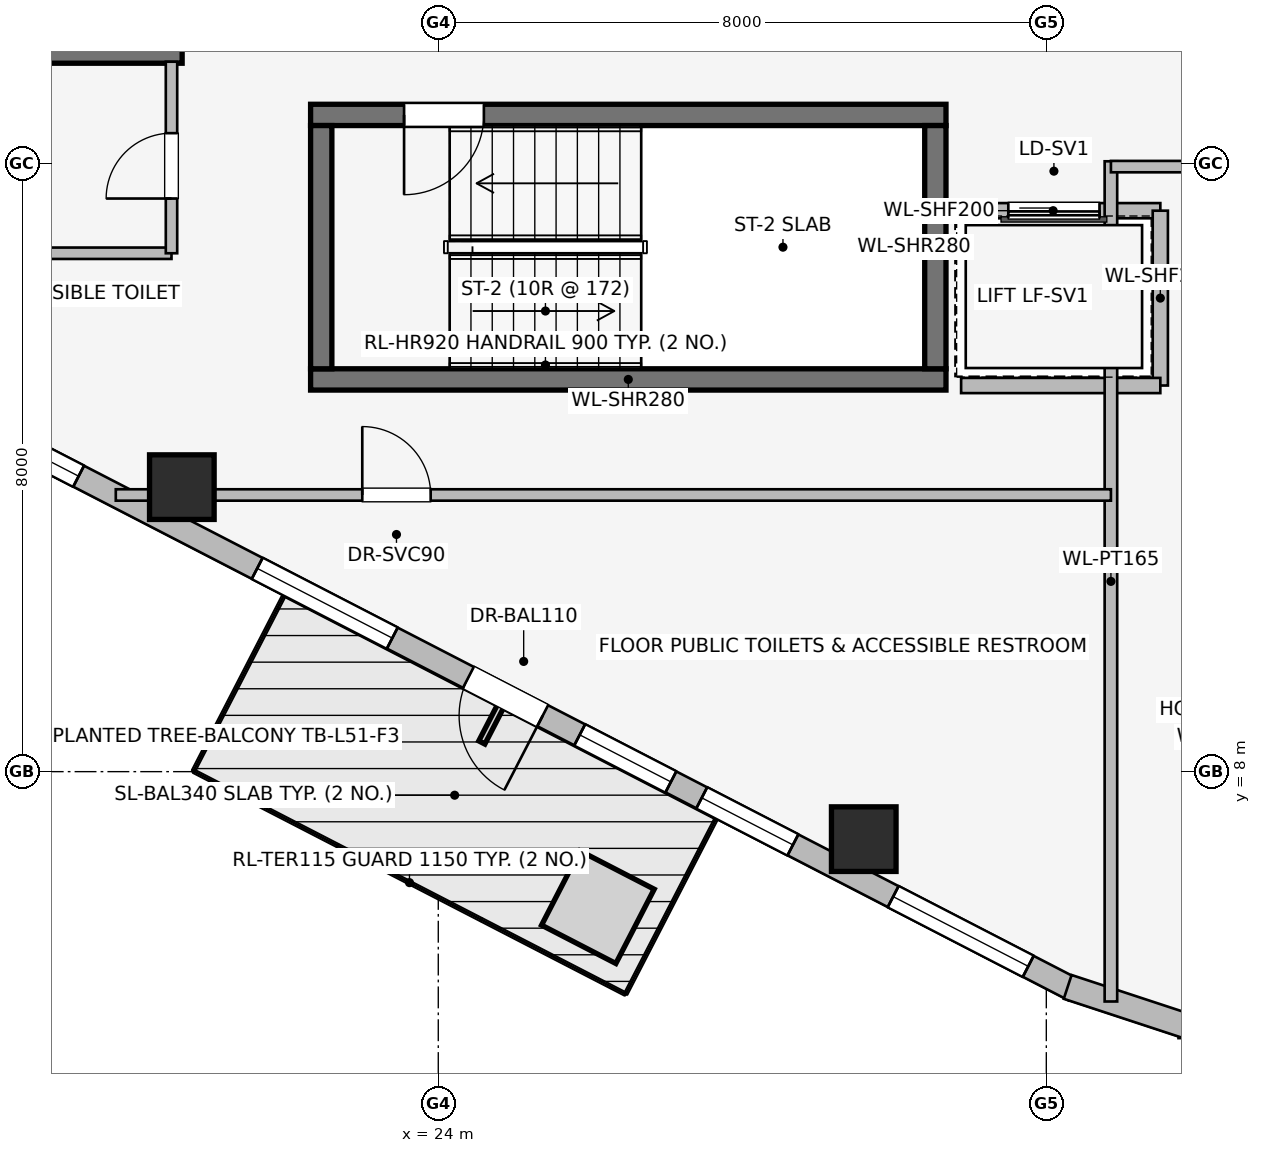
"""IFC4 building model, lengths in metres.
Left out: names, types, materials, properties, quantities, classifications, styles, units other than length and angle.
Written with IfcOpenShell. Run it as: python <this file> out.ifc"""

import sys

from ifc_helpers import new_model, si_unit, direction, frame, frame_2d, origin, origin_2d, place, context, subcontext, project, spatial, rectangle, extrude, element, fill, save


model = new_model("IFC4")
c1 = context("Model", 3, precision=1e-05, world=origin(), true_north=direction((0.0, 1.0)))
c2 = subcontext(c1, "Body", "Model", "MODEL_VIEW")
j1 = project(units=[si_unit("LENGTHUNIT", "METRE"), si_unit("PLANEANGLEUNIT", "RADIAN")], contexts=[c1])
p1 = place(None, origin())
s1 = spatial("IfcSite", under=j1, at=p1, CompositionType="ELEMENT")
p2 = place(p1, origin())
s2 = spatial("IfcBuilding", under=s1, at=p2, CompositionType="ELEMENT")
p3 = place(p2, frame((0.0, 0.0, 187.8)))
s3 = spatial("IfcBuildingStorey", under=s2, at=p3, CompositionType="ELEMENT", Elevation=187.8)
p4 = place(p3, frame((16.87, 17.46, 0.0), z_axis=(0.0, 0.0, 1.0), x_axis=(1.0, 0.0, 0.0)))
e1 = element("IfcWall", 1, at=p4, inside=s3, PredefinedType="SHEAR", context=c2, shape_type="SweptSolid", body=[
    extrude(rectangle(XDim=3.76, YDim=0.28, at=frame_2d((1.88, 0.0))), origin(), (0.0, 0.0, 1.0), 3.45),
])
p5 = place(p3, frame((22.32, 13.16, 0.0), z_axis=(0.0, 0.0, 1.0), x_axis=(1.0, 0.0, 0.0)))
e2 = element("IfcWall", 2, at=p5, inside=s3, PredefinedType="SHEAR", context=c2, shape_type="SweptSolid", body=[
    extrude(rectangle(XDim=8.36, YDim=0.28, at=frame_2d((4.18, 0.0))), origin(), (0.0, 0.0, 1.0), 3.45),
])
p6 = place(p3, frame((30.68, 16.64, 0.0), z_axis=(0.0, 0.0, 1.0), x_axis=(-1.0, 0.0, 0.0)))
e3 = element("IfcWall", 3, at=p6, inside=s3, PredefinedType="SHEAR", context=c2, shape_type="SweptSolid", body=[
    extrude(rectangle(XDim=8.36, YDim=0.28, at=frame_2d((4.18, 0.0))), origin(), (0.0, 0.0, 1.0), 3.45),
])
p7 = place(p6, frame((6.08, 0.0, 0.0)))
e4 = element("IfcOpeningElement", 4, at=p7, cuts=e3, PredefinedType="OPENING", context=c2, shape_type="SweptSolid", body=[
    extrude(rectangle(XDim=1.05, YDim=2.0, at=frame_2d((0.525, 1.0))), frame((0.0, 0.15, 0.0), z_axis=(0.0, -1.0, 0.0), x_axis=(1.0, 0.0, 0.0)), (0.0, 0.0, 1.0), 0.3),
])
for number, where, z_axis, x_axis in (
    (5, (22.46, 16.5, 0.0), (0.0, 0.0, 1.0), (0.0, -1.0, 0.0)),
    (6, (30.54, 13.3, 0.0), (0.0, 0.0, 1.0), (0.0, 1.0, 0.0)),
):
    element("IfcWall", number, at=place(p3, frame(where, z_axis=z_axis, x_axis=x_axis)), inside=s3, PredefinedType="SHEAR", context=c2, shape_type="SweptSolid", body=[
        extrude(rectangle(XDim=3.2, YDim=0.28, at=frame_2d((1.6, 0.0))), origin(), (0.0, 0.0, 1.0), 3.45),
    ])
for number, where, z_axis, x_axis in (
    (7, (20.626, 11.743, 0.0), (0.0, 0.0, 1.0), (1.0, 0.0, 0.0)),
    (8, (29.598, 7.112, 0.0), (0.0, 0.0, 1.0), (1.0, 0.0, 0.0)),
):
    element("IfcColumn", number, at=place(p3, frame(where, z_axis=z_axis, x_axis=x_axis)), inside=s3, PredefinedType="COLUMN", context=c2, shape_type="SweptSolid", body=[
        extrude(rectangle(XDim=0.85, YDim=0.85, at=origin_2d()), origin(), (0.0, 0.0, 1.0), 3.45),
    ])
p8 = place(p3, frame((32.362, 5.129, 0.0), z_axis=(0.0, 0.0, 1.0), x_axis=(-0.888626188278, 0.458632202867, 0.0)))
e9 = element("IfcWall", 9, at=p8, inside=s3, PredefinedType="STANDARD", context=c2, shape_type="SweptSolid", body=[
    extrude(rectangle(XDim=16.828, YDim=0.31, at=frame_2d((8.414, 0.0))), origin(), (0.0, 0.0, 1.0), 3.14),
])
p9 = place(p8, frame((7.864, 0.0, 0.0)))
e10 = element("IfcOpeningElement", 10, at=p9, cuts=e9, PredefinedType="OPENING", context=c2, shape_type="SweptSolid", body=[
    extrude(rectangle(XDim=1.1, YDim=2.04, at=frame_2d((0.55, 1.02))), frame((0.0, 0.165, 0.0), z_axis=(0.0, -1.0, 0.0), x_axis=(1.0, 0.0, 0.0)), (0.0, 0.0, 1.0), 0.33),
])
p10 = place(p8, frame((0.675, 0.0, 0.75)))
e11 = element("IfcOpeningElement", 11, at=p10, cuts=e9, PredefinedType="OPENING", context=c2, shape_type="SweptSolid", body=[
    extrude(rectangle(XDim=2.0, YDim=1.5, at=frame_2d((1.0, 0.75))), frame((0.0, 0.165, 0.0), z_axis=(0.0, -1.0, 0.0), x_axis=(1.0, 0.0, 0.0)), (0.0, 0.0, 1.0), 0.33),
])
p11 = place(p8, frame((4.159, 0.0, 0.75)))
e12 = element("IfcOpeningElement", 12, at=p11, cuts=e9, PredefinedType="OPENING", context=c2, shape_type="SweptSolid", body=[
    extrude(rectangle(XDim=1.35, YDim=1.45, at=frame_2d((0.675, 0.725))), frame((0.0, 0.165, 0.0), z_axis=(0.0, -1.0, 0.0), x_axis=(1.0, 0.0, 0.0)), (0.0, 0.0, 1.0), 0.33),
])
p12 = place(p8, frame((5.966, 0.0, 0.75)))
e13 = element("IfcOpeningElement", 13, at=p12, cuts=e9, PredefinedType="OPENING", context=c2, shape_type="SweptSolid", body=[
    extrude(rectangle(XDim=1.35, YDim=1.45, at=frame_2d((0.675, 0.725))), frame((0.0, 0.165, 0.0), z_axis=(0.0, -1.0, 0.0), x_axis=(1.0, 0.0, 0.0)), (0.0, 0.0, 1.0), 0.33),
])
p13 = place(p8, frame((10.091, 0.0, 0.75)))
e14 = element("IfcOpeningElement", 14, at=p13, cuts=e9, PredefinedType="OPENING", context=c2, shape_type="SweptSolid", body=[
    extrude(rectangle(XDim=2.0, YDim=1.5, at=frame_2d((1.0, 0.75))), frame((0.0, 0.165, 0.0), z_axis=(0.0, -1.0, 0.0), x_axis=(1.0, 0.0, 0.0)), (0.0, 0.0, 1.0), 0.33),
])
p14 = place(p8, frame((14.735, 0.0, 0.75)))
e15 = element("IfcOpeningElement", 15, at=p14, cuts=e9, PredefinedType="OPENING", context=c2, shape_type="SweptSolid", body=[
    extrude(rectangle(XDim=1.35, YDim=1.45, at=frame_2d((0.675, 0.725))), frame((0.0, 0.165, 0.0), z_axis=(0.0, -1.0, 0.0), x_axis=(1.0, 0.0, 0.0)), (0.0, 0.0, 1.0), 0.33),
])
p15 = place(p3, frame((35.461, 4.659, 0.0), z_axis=(0.0, 0.0, 1.0), x_axis=(-1.0, 0.0, 0.0)))
e16 = element("IfcWall", 16, at=p15, inside=s3, PredefinedType="STANDARD", context=c2, shape_type="SweptSolid", body=[
    extrude(rectangle(XDim=1.722, YDim=0.33, at=frame_2d((0.861, 0.0))), origin(), (0.0, 0.0, 1.0), 3.14),
])
p16 = place(p3, frame((33.917, 4.63, 0.0), z_axis=(0.0, 0.0, 1.0), x_axis=(-0.949937416267, 0.312440242569, 0.0)))
e17 = element("IfcWall", 17, at=p16, inside=s3, PredefinedType="STANDARD", context=c2, shape_type="SweptSolid", body=[
    extrude(rectangle(XDim=1.722, YDim=0.33, at=frame_2d((0.861, 0.0))), origin(), (0.0, 0.0, 1.0), 3.14),
])
p17 = place(p3, frame((33.5, 15.38, 0.0), z_axis=(0.0, 0.0, 1.0), x_axis=(-1.0, 0.0, 0.0)))
e18 = element("IfcWall", 18, at=p17, inside=s3, PredefinedType="PARTITIONING", context=c2, shape_type="SweptSolid", body=[
    extrude(rectangle(XDim=2.82, YDim=0.2, at=frame_2d((1.41, 0.0))), origin(), (0.0, 0.0, 1.0), 3.14),
])
p18 = place(p17, frame((0.8, 0.0, 0.0)))
e19 = element("IfcOpeningElement", 19, at=p18, cuts=e18, PredefinedType="OPENING", context=c2, shape_type="SweptSolid", body=[
    extrude(rectangle(XDim=1.2, YDim=2.2, at=frame_2d((0.6, 1.1))), frame((0.0, 0.11, 0.0), z_axis=(0.0, -1.0, 0.0), x_axis=(1.0, 0.0, 0.0)), (0.0, 0.0, 1.0), 0.22),
])
p19 = place(p3, frame((33.5, 13.08, 0.0), z_axis=(0.0, 0.0, 1.0), x_axis=(0.0, 1.0, 0.0)))
e20 = element("IfcWall", 20, at=p19, inside=s3, PredefinedType="PARTITIONING", context=c2, shape_type="SweptSolid", body=[
    extrude(rectangle(XDim=2.3, YDim=0.2, at=frame_2d((1.15, 0.0))), origin(), (0.0, 0.0, 1.0), 3.14),
])
p20 = place(p3, frame((30.879, 13.08, 0.0), z_axis=(0.0, 0.0, 1.0), x_axis=(1.0, 0.0, 0.0)))
e21 = element("IfcWall", 21, at=p20, inside=s3, PredefinedType="PARTITIONING", context=c2, shape_type="SweptSolid", body=[
    extrude(rectangle(XDim=2.621, YDim=0.2, at=frame_2d((1.311, 0.0))), origin(), (0.0, 0.0, 1.0), 3.14),
])
p21 = place(p3, frame((18.1, 14.82, 0.0), z_axis=(0.0, 0.0, 1.0), x_axis=(1.0, 0.0, 0.0)))
e22 = element("IfcWall", 22, at=p21, inside=s3, PredefinedType="PARTITIONING", context=c2, shape_type="SweptSolid", body=[
    extrude(rectangle(XDim=2.39, YDim=0.15, at=frame_2d((1.195, 0.0))), origin(), (0.0, 0.0, 1.0), 3.14),
])
p22 = place(p3, frame((20.49, 14.82, 0.0), z_axis=(0.0, 0.0, 1.0), x_axis=(0.0, 1.0, 0.0)))
e23 = element("IfcWall", 23, at=p22, inside=s3, PredefinedType="PARTITIONING", context=c2, shape_type="SweptSolid", body=[
    extrude(rectangle(XDim=2.52, YDim=0.15, at=frame_2d((1.26, 0.0))), origin(), (0.0, 0.0, 1.0), 3.14),
])
p23 = place(p22, frame((0.72, 0.0, 0.0)))
e24 = element("IfcOpeningElement", 24, at=p23, cuts=e23, PredefinedType="OPENING", context=c2, shape_type="SweptSolid", body=[
    extrude(rectangle(XDim=0.86, YDim=2.0, at=frame_2d((0.43, 1.0))), frame((0.0, 0.085, 0.0), z_axis=(0.0, -1.0, 0.0), x_axis=(1.0, 0.0, 0.0)), (0.0, 0.0, 1.0), 0.17),
])
p24 = place(p3, frame((32.85, 4.976, 0.0), z_axis=(0.0, 0.0, 1.0), x_axis=(0.0, 1.0, 0.0)))
e25 = element("IfcWall", 25, at=p24, inside=s3, PredefinedType="PARTITIONING", context=c2, shape_type="SweptSolid", body=[
    extrude(rectangle(XDim=11.054, YDim=0.165, at=frame_2d((5.527, 0.0))), origin(), (0.0, 0.0, 1.0), 3.14),
])
p25 = place(p3, frame((19.757, 11.64, 0.0), z_axis=(0.0, 0.0, 1.0), x_axis=(1.0, 0.0, 0.0)))
e26 = element("IfcWall", 26, at=p25, inside=s3, PredefinedType="PARTITIONING", context=c2, shape_type="SweptSolid", body=[
    extrude(rectangle(XDim=13.093, YDim=0.15, at=frame_2d((6.546, 0.0))), origin(), (0.0, 0.0, 1.0), 3.14),
])
p26 = place(p25, frame((3.243, 0.0, 0.0)))
e27 = element("IfcOpeningElement", 27, at=p26, cuts=e26, PredefinedType="OPENING", context=c2, shape_type="SweptSolid", body=[
    extrude(rectangle(XDim=0.9, YDim=2.0, at=frame_2d((0.45, 1.0))), frame((0.0, 0.085, 0.0), z_axis=(0.0, -1.0, 0.0), x_axis=(1.0, 0.0, 0.0)), (0.0, 0.0, 1.0), 0.17),
])
p27 = place(p3, frame((32.85, 15.96, 0.0), z_axis=(0.0, 0.0, 1.0), x_axis=(1.0, 0.0, 0.0)))
e28 = element("IfcWall", 28, at=p27, inside=s3, PredefinedType="PARTITIONING", context=c2, shape_type="SweptSolid", body=[
    extrude(rectangle(XDim=4.245, YDim=0.15, at=frame_2d((2.123, 0.0))), origin(), (0.0, 0.0, 1.0), 3.14),
])
p28 = place(p27, frame((1.643, 0.0, 0.0)))
e29 = element("IfcOpeningElement", 29, at=p28, cuts=e28, PredefinedType="OPENING", context=c2, shape_type="SweptSolid", body=[
    extrude(rectangle(XDim=0.96, YDim=2.0, at=frame_2d((0.48, 1.0))), frame((0.0, 0.085, 0.0), z_axis=(0.0, -1.0, 0.0), x_axis=(1.0, 0.0, 0.0)), (0.0, 0.0, 1.0), 0.17),
])
p29 = place(p9, origin())
e30 = element("IfcDoor", 30, at=p29, inside=s3, OperationType="SINGLE_SWING_LEFT", PredefinedType="DOOR", context=c2, shape_type="SweptSolid", body=[
    extrude(rectangle(XDim=1.1, YDim=2.04, at=frame_2d((0.55, 1.02))), frame((0.0, 0.025, 0.0), z_axis=(0.0, -1.0, 0.0), x_axis=(1.0, 0.0, 0.0)), (0.0, 0.0, 1.0), 0.05),
])
fill(e10, e30)
p30 = place(p10, origin())
e31 = element("IfcWindow", 31, at=p30, inside=s3, PartitioningType="SINGLE_PANEL", PredefinedType="WINDOW", context=c2, shape_type="SweptSolid", body=[
    extrude(rectangle(XDim=2.0, YDim=1.5, at=frame_2d((1.0, 0.75))), frame((0.0, 0.03, 0.0), z_axis=(0.0, -1.0, 0.0), x_axis=(1.0, 0.0, 0.0)), (0.0, 0.0, 1.0), 0.06),
])
fill(e11, e31)
p31 = place(p11, origin())
e32 = element("IfcWindow", 32, at=p31, inside=s3, PartitioningType="SINGLE_PANEL", PredefinedType="WINDOW", context=c2, shape_type="SweptSolid", body=[
    extrude(rectangle(XDim=1.35, YDim=1.45, at=frame_2d((0.675, 0.725))), frame((0.0, 0.03, 0.0), z_axis=(0.0, -1.0, 0.0), x_axis=(1.0, 0.0, 0.0)), (0.0, 0.0, 1.0), 0.06),
])
fill(e12, e32)
p32 = place(p12, origin())
e33 = element("IfcWindow", 33, at=p32, inside=s3, PartitioningType="SINGLE_PANEL", PredefinedType="WINDOW", context=c2, shape_type="SweptSolid", body=[
    extrude(rectangle(XDim=1.35, YDim=1.45, at=frame_2d((0.675, 0.725))), frame((0.0, 0.03, 0.0), z_axis=(0.0, -1.0, 0.0), x_axis=(1.0, 0.0, 0.0)), (0.0, 0.0, 1.0), 0.06),
])
fill(e13, e33)
p33 = place(p13, origin())
e34 = element("IfcWindow", 34, at=p33, inside=s3, PartitioningType="SINGLE_PANEL", PredefinedType="WINDOW", context=c2, shape_type="SweptSolid", body=[
    extrude(rectangle(XDim=2.0, YDim=1.5, at=frame_2d((1.0, 0.75))), frame((0.0, 0.03, 0.0), z_axis=(0.0, -1.0, 0.0), x_axis=(1.0, 0.0, 0.0)), (0.0, 0.0, 1.0), 0.06),
])
fill(e14, e34)
p34 = place(p14, origin())
e35 = element("IfcWindow", 35, at=p34, inside=s3, PartitioningType="SINGLE_PANEL", PredefinedType="WINDOW", context=c2, shape_type="SweptSolid", body=[
    extrude(rectangle(XDim=1.35, YDim=1.45, at=frame_2d((0.675, 0.725))), frame((0.0, 0.03, 0.0), z_axis=(0.0, -1.0, 0.0), x_axis=(1.0, 0.0, 0.0)), (0.0, 0.0, 1.0), 0.06),
])
fill(e15, e35)
p35 = place(p7, origin())
e36 = element("IfcDoor", 36, at=p35, inside=s3, OperationType="SINGLE_SWING_RIGHT", PredefinedType="DOOR", context=c2, shape_type="SweptSolid", body=[
    extrude(rectangle(XDim=1.05, YDim=2.0, at=frame_2d((0.525, 1.0))), frame((0.0, 0.025, 0.0), z_axis=(0.0, -1.0, 0.0), x_axis=(1.0, 0.0, 0.0)), (0.0, 0.0, 1.0), 0.05),
])
fill(e4, e36)
p36 = place(p18, origin())
e37 = element("IfcDoor", 37, at=p36, inside=s3, OperationType="SLIDING_TO_RIGHT", PredefinedType="DOOR", context=c2, shape_type="SweptSolid", body=[
    extrude(rectangle(XDim=1.2, YDim=2.2, at=frame_2d((0.6, 1.1))), frame((0.0, 0.025, 0.0), z_axis=(0.0, -1.0, 0.0), x_axis=(1.0, 0.0, 0.0)), (0.0, 0.0, 1.0), 0.05),
])
fill(e19, e37)
p37 = place(p23, origin())
e38 = element("IfcDoor", 38, at=p37, inside=s3, OperationType="SINGLE_SWING_LEFT", PredefinedType="DOOR", context=c2, shape_type="SweptSolid", body=[
    extrude(rectangle(XDim=0.86, YDim=2.0, at=frame_2d((0.43, 1.0))), frame((0.0, 0.025, 0.0), z_axis=(0.0, -1.0, 0.0), x_axis=(1.0, 0.0, 0.0)), (0.0, 0.0, 1.0), 0.05),
])
fill(e24, e38)
p38 = place(p26, origin())
e39 = element("IfcDoor", 39, at=p38, inside=s3, OperationType="SINGLE_SWING_LEFT", PredefinedType="DOOR", context=c2, shape_type="SweptSolid", body=[
    extrude(rectangle(XDim=0.9, YDim=2.0, at=frame_2d((0.45, 1.0))), frame((0.0, 0.025, 0.0), z_axis=(0.0, -1.0, 0.0), x_axis=(1.0, 0.0, 0.0)), (0.0, 0.0, 1.0), 0.05),
])
fill(e27, e39)
save(model, sys.argv[1])
